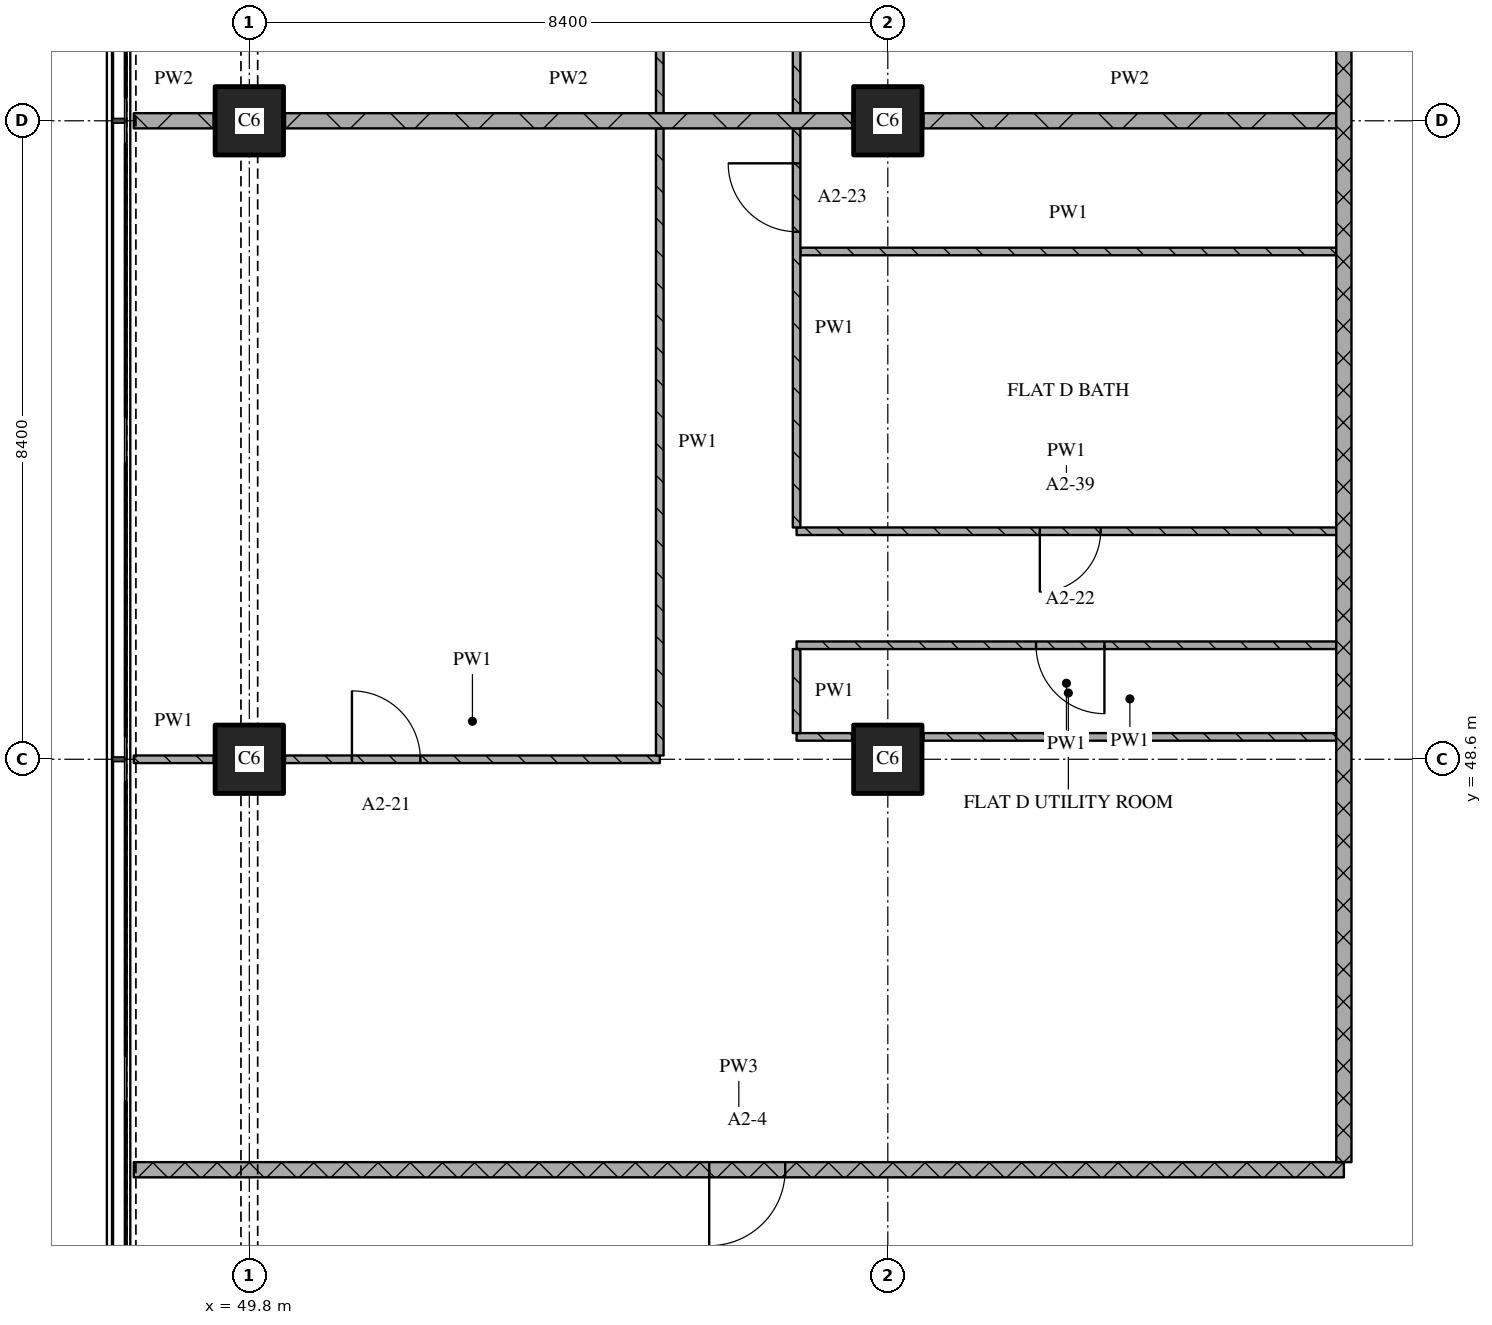
"""IFC4 building model, lengths in metres.
Left out: names, types, materials, properties, quantities, classifications, styles, units other than length and angle.
Written with IfcOpenShell. Run it as: python <this file> out.ifc"""

import sys

from ifc_helpers import new_model, si_unit, direction, frame, frame_2d, origin, origin_2d, place, context, subcontext, project, spatial, rectangle, extrude, element, fill, save


model = new_model("IFC4")
c1 = context("Model", 3, precision=1e-05, world=origin(), true_north=direction((0.0, 1.0)))
c2 = subcontext(c1, "Body", "Model", "MODEL_VIEW")
j1 = project(units=[si_unit("LENGTHUNIT", "METRE"), si_unit("PLANEANGLEUNIT", "RADIAN")], contexts=[c1])
p1 = place(None, origin())
s1 = spatial("IfcSite", under=j1, at=p1, CompositionType="ELEMENT")
p2 = place(p1, origin())
s2 = spatial("IfcBuilding", under=s1, at=p2, CompositionType="ELEMENT")
p3 = place(p2, frame((0.0, 0.0, 55.2)))
s3 = spatial("IfcBuildingStorey", under=s2, at=p3, CompositionType="ELEMENT", Elevation=55.2)
for number, where, z_axis, x_axis in (
    (1, (49.8, 48.6, 0.0), (0.0, 0.0, 1.0), (1.0, 0.0, 0.0)),
    (2, (49.8, 57.0, 0.0), (0.0, 0.0, 1.0), (1.0, 0.0, 0.0)),
    (3, (58.2, 48.6, 0.0), (0.0, 0.0, 1.0), (1.0, 0.0, 0.0)),
    (4, (58.2, 57.0, 0.0), (0.0, 0.0, 1.0), (1.0, 0.0, 0.0)),
):
    element("IfcColumn", number, at=place(p3, frame(where, z_axis=z_axis, x_axis=x_axis)), inside=s3, PredefinedType="COLUMN", context=c2, shape_type="SweptSolid", body=[
        extrude(rectangle(XDim=0.9, YDim=0.9, at=origin_2d()), origin(), (0.0, 0.0, 1.0), 3.6),
    ])
p4 = place(p3, frame((48.28, 43.2, 0.0), z_axis=(0.0, 0.0, 1.0), x_axis=(1.0, 0.0, 0.0)))
e5 = element("IfcWall", 5, at=p4, inside=s3, PredefinedType="PARTITIONING", context=c2, shape_type="SweptSolid", body=[
    extrude(rectangle(XDim=15.92, YDim=0.2, at=frame_2d((7.96, 0.0))), origin(), (0.0, 0.0, 1.0), 3.32),
])
p5 = place(p4, frame((7.57, 0.0, 0.0)))
e6 = element("IfcOpeningElement", 6, at=p5, cuts=e5, PredefinedType="OPENING", context=c2, shape_type="SweptSolid", body=[
    extrude(rectangle(XDim=1.0, YDim=2.1, at=frame_2d((0.5, 1.05))), frame((0.0, 0.11, 0.0), z_axis=(0.0, -1.0, 0.0), x_axis=(1.0, 0.0, 0.0)), (0.0, 0.0, 1.0), 0.22),
])
p6 = place(p3, frame((48.28, 48.6, 0.0), z_axis=(0.0, 0.0, 1.0), x_axis=(1.0, 0.0, 0.0)))
e7 = element("IfcWall", 7, at=p6, inside=s3, PredefinedType="PARTITIONING", context=c2, shape_type="SweptSolid", body=[
    extrude(rectangle(XDim=1.05, YDim=0.1, at=frame_2d((0.525, 0.0))), origin(), (0.0, 0.0, 1.0), 3.32),
])
p7 = place(p3, frame((50.27, 48.6, 0.0), z_axis=(0.0, 0.0, 1.0), x_axis=(1.0, 0.0, 0.0)))
e8 = element("IfcWall", 8, at=p7, inside=s3, PredefinedType="PARTITIONING", context=c2, shape_type="SweptSolid", body=[
    extrude(rectangle(XDim=4.93, YDim=0.1, at=frame_2d((2.465, 0.0))), origin(), (0.0, 0.0, 1.0), 3.32),
])
p8 = place(p7, frame((0.88, 0.0, 0.0)))
e9 = element("IfcOpeningElement", 9, at=p8, cuts=e8, PredefinedType="OPENING", context=c2, shape_type="SweptSolid", body=[
    extrude(rectangle(XDim=0.9, YDim=2.1, at=frame_2d((0.45, 1.05))), frame((0.0, 0.06, 0.0), z_axis=(0.0, -1.0, 0.0), x_axis=(1.0, 0.0, 0.0)), (0.0, 0.0, 1.0), 0.12),
])
p9 = place(p3, frame((57.0, 48.894, 0.0), z_axis=(0.0, 0.0, 1.0), x_axis=(1.0, 0.0, 0.0)))
e10 = element("IfcWall", 10, at=p9, inside=s3, PredefinedType="PARTITIONING", context=c2, shape_type="SweptSolid", body=[
    extrude(rectangle(XDim=0.73, YDim=0.1, at=frame_2d((0.365, 0.0))), origin(), (0.0, 0.0, 1.0), 3.32),
])
p10 = place(p3, frame((58.67, 48.894, 0.0), z_axis=(0.0, 0.0, 1.0), x_axis=(1.0, 0.0, 0.0)))
e11 = element("IfcWall", 11, at=p10, inside=s3, PredefinedType="PARTITIONING", context=c2, shape_type="SweptSolid", body=[
    extrude(rectangle(XDim=5.43, YDim=0.1, at=frame_2d((2.715, 0.0))), origin(), (0.0, 0.0, 1.0), 3.32),
])
p11 = place(p3, frame((64.1, 50.1, 0.0), z_axis=(0.0, 0.0, 1.0), x_axis=(-1.0, 0.0, 0.0)))
e12 = element("IfcWall", 12, at=p11, inside=s3, PredefinedType="PARTITIONING", context=c2, shape_type="SweptSolid", body=[
    extrude(rectangle(XDim=7.1, YDim=0.1, at=frame_2d((3.55, 0.0))), origin(), (0.0, 0.0, 1.0), 3.32),
])
p12 = place(p11, frame((3.05, 0.0, 0.0)))
e13 = element("IfcOpeningElement", 13, at=p12, cuts=e12, PredefinedType="OPENING", context=c2, shape_type="SweptSolid", body=[
    extrude(rectangle(XDim=0.9, YDim=2.1, at=frame_2d((0.45, 1.05))), frame((0.0, 0.06, 0.0), z_axis=(0.0, -1.0, 0.0), x_axis=(1.0, 0.0, 0.0)), (0.0, 0.0, 1.0), 0.12),
])
p13 = place(p3, frame((57.0, 51.6, 0.0), z_axis=(0.0, 0.0, 1.0), x_axis=(1.0, 0.0, 0.0)))
e14 = element("IfcWall", 14, at=p13, inside=s3, PredefinedType="PARTITIONING", context=c2, shape_type="SweptSolid", body=[
    extrude(rectangle(XDim=7.1, YDim=0.1, at=frame_2d((3.55, 0.0))), origin(), (0.0, 0.0, 1.0), 3.32),
])
p14 = place(p13, frame((3.2, 0.0, 0.0)))
e15 = element("IfcOpeningElement", 15, at=p14, cuts=e14, PredefinedType="OPENING", context=c2, shape_type="SweptSolid", body=[
    extrude(rectangle(XDim=0.8, YDim=2.1, at=frame_2d((0.4, 1.05))), frame((0.0, 0.06, 0.0), z_axis=(0.0, -1.0, 0.0), x_axis=(1.0, 0.0, 0.0)), (0.0, 0.0, 1.0), 0.12),
])
p15 = place(p3, frame((57.05, 55.281, 0.0), z_axis=(0.0, 0.0, 1.0), x_axis=(1.0, 0.0, 0.0)))
e16 = element("IfcWall", 16, at=p15, inside=s3, PredefinedType="PARTITIONING", context=c2, shape_type="SweptSolid", body=[
    extrude(rectangle(XDim=7.05, YDim=0.1, at=frame_2d((3.525, 0.0))), origin(), (0.0, 0.0, 1.0), 3.32),
])
p16 = place(p3, frame((48.28, 57.0, 0.0), z_axis=(0.0, 0.0, 1.0), x_axis=(1.0, 0.0, 0.0)))
e17 = element("IfcWall", 17, at=p16, inside=s3, PredefinedType="PARTITIONING", context=c2, shape_type="SweptSolid", body=[
    extrude(rectangle(XDim=1.05, YDim=0.2, at=frame_2d((0.525, 0.0))), origin(), (0.0, 0.0, 1.0), 3.32),
])
p17 = place(p3, frame((50.27, 57.0, 0.0), z_axis=(0.0, 0.0, 1.0), x_axis=(1.0, 0.0, 0.0)))
e18 = element("IfcWall", 18, at=p17, inside=s3, PredefinedType="PARTITIONING", context=c2, shape_type="SweptSolid", body=[
    extrude(rectangle(XDim=7.46, YDim=0.2, at=frame_2d((3.73, 0.0))), origin(), (0.0, 0.0, 1.0), 3.32),
])
p18 = place(p3, frame((58.67, 57.0, 0.0), z_axis=(0.0, 0.0, 1.0), x_axis=(1.0, 0.0, 0.0)))
e19 = element("IfcWall", 19, at=p18, inside=s3, PredefinedType="PARTITIONING", context=c2, shape_type="SweptSolid", body=[
    extrude(rectangle(XDim=5.43, YDim=0.2, at=frame_2d((2.715, 0.0))), origin(), (0.0, 0.0, 1.0), 3.32),
])
p19 = place(p3, frame((57.0, 50.05, 0.0), z_axis=(0.0, 0.0, 1.0), x_axis=(0.0, -1.0, 0.0)))
e20 = element("IfcWall", 20, at=p19, inside=s3, PredefinedType="PARTITIONING", context=c2, shape_type="SweptSolid", body=[
    extrude(rectangle(XDim=1.106, YDim=0.1, at=frame_2d((0.553, 0.0))), origin(), (0.0, 0.0, 1.0), 3.32),
])
p20 = place(p3, frame((64.2, 43.3, 0.0), z_axis=(0.0, 0.0, 1.0), x_axis=(0.0, 1.0, 0.0)))
e21 = element("IfcWall", 21, at=p20, inside=s3, PredefinedType="PARTITIONING", context=c2, shape_type="SweptSolid", body=[
    extrude(rectangle(XDim=32.02, YDim=0.2, at=frame_2d((16.01, 0.0))), origin(), (0.0, 0.0, 1.0), 3.32),
])
p21 = place(p20, frame((19.95, 0.0, 0.0)))
e22 = element("IfcOpeningElement", 22, at=p21, cuts=e21, PredefinedType="OPENING", context=c2, shape_type="SweptSolid", body=[
    extrude(rectangle(XDim=1.0, YDim=2.1, at=frame_2d((0.5, 1.05))), frame((0.0, 0.11, 0.0), z_axis=(0.0, -1.0, 0.0), x_axis=(1.0, 0.0, 0.0)), (0.0, 0.0, 1.0), 0.22),
])
for number, where, z_axis, x_axis in (
    (23, (55.2, 56.9, 0.0), (0.0, 0.0, 1.0), (0.0, -1.0, 0.0)),
    (24, (55.2, 65.35, 0.0), (0.0, 0.0, 1.0), (0.0, -1.0, 0.0)),
):
    element("IfcWall", number, at=place(p3, frame(where, z_axis=z_axis, x_axis=x_axis)), inside=s3, PredefinedType="PARTITIONING", context=c2, shape_type="SweptSolid", body=[
        extrude(rectangle(XDim=8.25, YDim=0.1, at=frame_2d((4.125, 0.0))), origin(), (0.0, 0.0, 1.0), 3.32),
    ])
p22 = place(p3, frame((57.0, 56.9, 0.0), z_axis=(0.0, 0.0, 1.0), x_axis=(0.0, -1.0, 0.0)))
e25 = element("IfcWall", 25, at=p22, inside=s3, PredefinedType="PARTITIONING", context=c2, shape_type="SweptSolid", body=[
    extrude(rectangle(XDim=5.25, YDim=0.1, at=frame_2d((2.625, 0.0))), origin(), (0.0, 0.0, 1.0), 3.32),
])
p23 = place(p22, frame((0.46, 0.0, 0.0)))
e26 = element("IfcOpeningElement", 26, at=p23, cuts=e25, PredefinedType="OPENING", context=c2, shape_type="SweptSolid", body=[
    extrude(rectangle(XDim=0.9, YDim=2.1, at=frame_2d((0.45, 1.05))), frame((0.0, 0.06, 0.0), z_axis=(0.0, -1.0, 0.0), x_axis=(1.0, 0.0, 0.0)), (0.0, 0.0, 1.0), 0.12),
])
p24 = place(p3, frame((57.0, 62.95, 0.0), z_axis=(0.0, 0.0, 1.0), x_axis=(0.0, -1.0, 0.0)))
e27 = element("IfcWall", 27, at=p24, inside=s3, PredefinedType="PARTITIONING", context=c2, shape_type="SweptSolid", body=[
    extrude(rectangle(XDim=5.85, YDim=0.1, at=frame_2d((2.925, 0.0))), origin(), (0.0, 0.0, 1.0), 3.32),
])
p25 = place(p24, frame((3.71, 0.0, 0.0)))
e28 = element("IfcOpeningElement", 28, at=p25, cuts=e27, PredefinedType="OPENING", context=c2, shape_type="SweptSolid", body=[
    extrude(rectangle(XDim=0.8, YDim=2.1, at=frame_2d((0.4, 1.05))), frame((0.0, 0.06, 0.0), z_axis=(0.0, -1.0, 0.0), x_axis=(1.0, 0.0, 0.0)), (0.0, 0.0, 1.0), 0.12),
])
p26 = place(p5, origin())
e29 = element("IfcDoor", 29, at=p26, inside=s3, OperationType="SINGLE_SWING_RIGHT", PredefinedType="DOOR", context=c2, shape_type="SweptSolid", body=[
    extrude(rectangle(XDim=1.0, YDim=2.1, at=frame_2d((0.5, 1.05))), frame((0.0, 0.025, 0.0), z_axis=(0.0, -1.0, 0.0), x_axis=(1.0, 0.0, 0.0)), (0.0, 0.0, 1.0), 0.05),
])
fill(e6, e29)
p27 = place(p8, origin())
e30 = element("IfcDoor", 30, at=p27, inside=s3, OperationType="SINGLE_SWING_LEFT", PredefinedType="DOOR", context=c2, shape_type="SweptSolid", body=[
    extrude(rectangle(XDim=0.9, YDim=2.1, at=frame_2d((0.45, 1.05))), frame((0.0, 0.025, 0.0), z_axis=(0.0, -1.0, 0.0), x_axis=(1.0, 0.0, 0.0)), (0.0, 0.0, 1.0), 0.05),
])
fill(e9, e30)
p28 = place(p12, origin())
e31 = element("IfcDoor", 31, at=p28, inside=s3, OperationType="SINGLE_SWING_LEFT", PredefinedType="DOOR", context=c2, shape_type="SweptSolid", body=[
    extrude(rectangle(XDim=0.9, YDim=2.1, at=frame_2d((0.45, 1.05))), frame((0.0, 0.025, 0.0), z_axis=(0.0, -1.0, 0.0), x_axis=(1.0, 0.0, 0.0)), (0.0, 0.0, 1.0), 0.05),
])
fill(e13, e31)
p29 = place(p14, origin())
e32 = element("IfcDoor", 32, at=p29, inside=s3, OperationType="SINGLE_SWING_RIGHT", PredefinedType="DOOR", context=c2, shape_type="SweptSolid", body=[
    extrude(rectangle(XDim=0.8, YDim=2.1, at=frame_2d((0.4, 1.05))), frame((0.0, 0.025, 0.0), z_axis=(0.0, -1.0, 0.0), x_axis=(1.0, 0.0, 0.0)), (0.0, 0.0, 1.0), 0.05),
])
fill(e15, e32)
p30 = place(p23, origin())
e33 = element("IfcDoor", 33, at=p30, inside=s3, OperationType="SINGLE_SWING_RIGHT", PredefinedType="DOOR", context=c2, shape_type="SweptSolid", body=[
    extrude(rectangle(XDim=0.9, YDim=2.1, at=frame_2d((0.45, 1.05))), frame((0.0, 0.025, 0.0), z_axis=(0.0, -1.0, 0.0), x_axis=(1.0, 0.0, 0.0)), (0.0, 0.0, 1.0), 0.05),
])
fill(e26, e33)
save(model, sys.argv[1])
